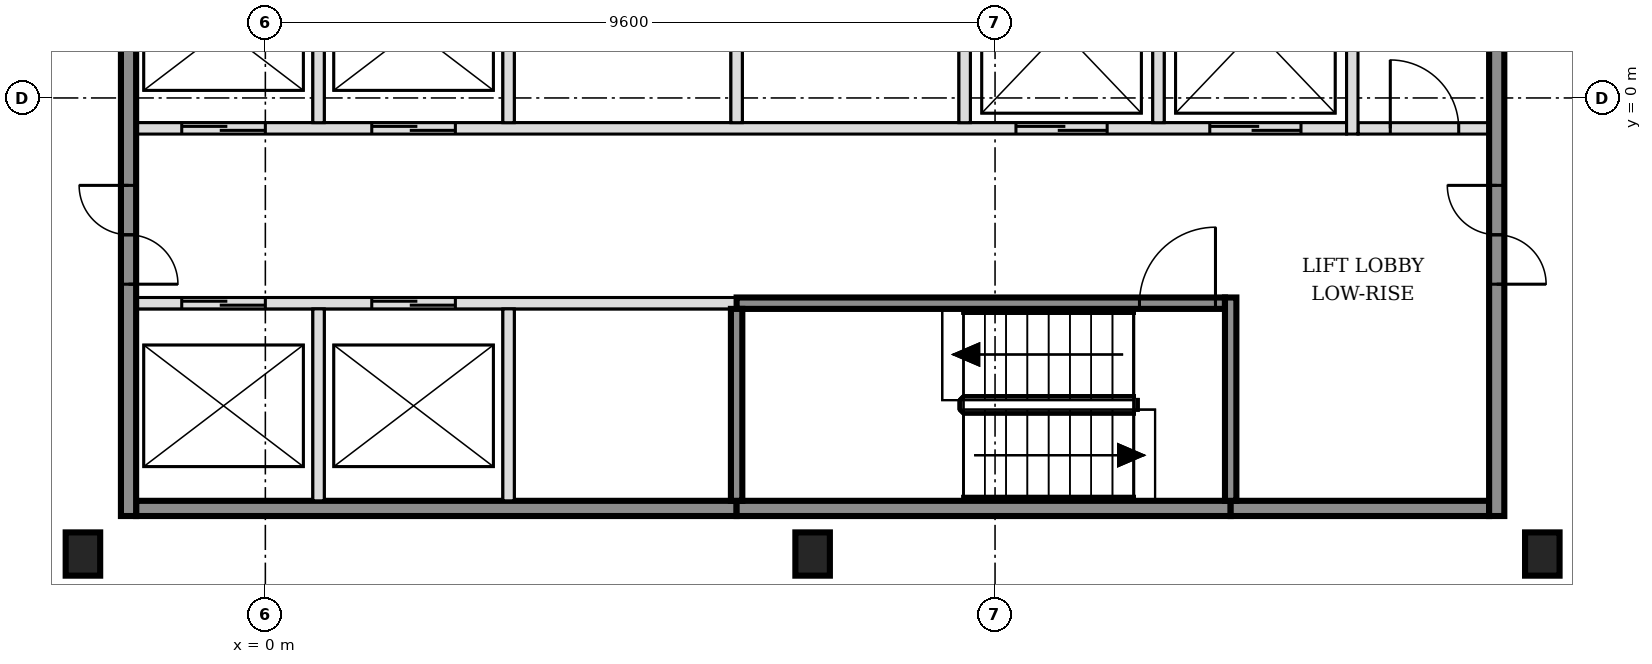
"""IFC4 building model, lengths in metres.
Left out: names, types, materials, properties, quantities, classifications, styles, units other than length and angle.
Written with IfcOpenShell. Run it as: python <this file> out.ifc"""

import sys

from ifc_helpers import new_model, si_unit, direction, frame, frame_2d, origin, origin_2d, place, context, subcontext, project, spatial, rectangle, i_section, extrude, element, fill, save


model = new_model("IFC4")
c1 = context("Model", 3, precision=1e-05, world=origin(), true_north=direction((0.0, 1.0)))
c2 = subcontext(c1, "Body", "Model", "MODEL_VIEW")
j1 = project(units=[si_unit("LENGTHUNIT", "METRE"), si_unit("PLANEANGLEUNIT", "RADIAN")], contexts=[c1])
p1 = place(None, origin())
s1 = spatial("IfcSite", under=j1, at=p1, CompositionType="ELEMENT")
p2 = place(p1, origin())
s2 = spatial("IfcBuilding", under=s1, at=p2, CompositionType="ELEMENT")
p3 = place(p2, frame((0.0, 0.0, 15.0)))
s3 = spatial("IfcBuildingStorey", under=s2, at=p3, CompositionType="ELEMENT", Elevation=15.0)
for number, where, z_axis, x_axis in (
    (1, (-2.4, -6.0, -0.2), (0.0, 0.0, 1.0), (1.0, 0.0, 0.0)),
    (2, (7.2, -6.0, -0.2), (0.0, 0.0, 1.0), (1.0, 0.0, 0.0)),
    (3, (16.8, -6.0, -0.2), (0.0, 0.0, 1.0), (1.0, 0.0, 0.0)),
):
    element("IfcColumn", number, at=place(p3, frame(where, z_axis=z_axis, x_axis=x_axis)), inside=s3, PredefinedType="COLUMN", context=c2, shape_type="SweptSolid", body=[
        extrude(i_section(OverallWidth=0.454, OverallDepth=0.569, WebThickness=0.078, FlangeThickness=0.125, FilletRadius=0.015, at=origin_2d()), origin(), (0.0, 0.0, 1.0), 6.0),
    ])
p4 = place(p3, frame((-1.7, -5.4, 0.0), z_axis=(0.0, 0.0, 1.0), x_axis=(1.0, 0.0, 0.0)))
e4 = element("IfcWall", 4, at=p4, inside=s3, PredefinedType="SOLIDWALL", context=c2, shape_type="SweptSolid", body=[
    extrude(rectangle(XDim=7.9, YDim=0.2, at=frame_2d((3.95, 0.0))), origin(), (0.0, 0.0, 1.0), 5.8),
])
p5 = place(p3, frame((6.2, -5.4, 0.0), z_axis=(0.0, 0.0, 1.0), x_axis=(1.0, 0.0, 0.0)))
e5 = element("IfcWall", 5, at=p5, inside=s3, PredefinedType="SOLIDWALL", context=c2, shape_type="SweptSolid", body=[
    extrude(rectangle(XDim=6.5, YDim=0.2, at=frame_2d((3.25, 0.0))), origin(), (0.0, 0.0, 1.0), 5.8),
])
p6 = place(p3, frame((12.7, -5.4, 0.0), z_axis=(0.0, 0.0, 1.0), x_axis=(1.0, 0.0, 0.0)))
e6 = element("IfcWall", 6, at=p6, inside=s3, PredefinedType="SOLIDWALL", context=c2, shape_type="SweptSolid", body=[
    extrude(rectangle(XDim=3.4, YDim=0.2, at=frame_2d((1.7, 0.0))), origin(), (0.0, 0.0, 1.0), 5.8),
])
p7 = place(p3, frame((-1.7, -2.7, 0.0), z_axis=(0.0, 0.0, 1.0), x_axis=(1.0, 0.0, 0.0)))
e7 = element("IfcWall", 7, at=p7, inside=s3, PredefinedType="SOLIDWALL", context=c2, shape_type="SweptSolid", body=[
    extrude(rectangle(XDim=7.9, YDim=0.15, at=frame_2d((3.95, 0.0))), origin(), (0.0, 0.0, 1.0), 5.8),
])
p8 = place(p7, frame((0.6, 0.0, 0.0)))
e8 = element("IfcOpeningElement", 8, at=p8, cuts=e7, PredefinedType="OPENING", context=c2, shape_type="SweptSolid", body=[
    extrude(rectangle(XDim=1.1, YDim=2.1, at=frame_2d((0.55, 1.05))), frame((0.0, 0.085, 0.0), z_axis=(0.0, -1.0, 0.0), x_axis=(1.0, 0.0, 0.0)), (0.0, 0.0, 1.0), 0.17),
])
p9 = place(p7, frame((3.1, 0.0, 0.0)))
e9 = element("IfcOpeningElement", 9, at=p9, cuts=e7, PredefinedType="OPENING", context=c2, shape_type="SweptSolid", body=[
    extrude(rectangle(XDim=1.1, YDim=2.1, at=frame_2d((0.55, 1.05))), frame((0.0, 0.085, 0.0), z_axis=(0.0, -1.0, 0.0), x_axis=(1.0, 0.0, 0.0)), (0.0, 0.0, 1.0), 0.17),
])
p10 = place(p3, frame((6.2, -2.7, 0.0), z_axis=(0.0, 0.0, 1.0), x_axis=(1.0, 0.0, 0.0)))
e10 = element("IfcWall", 10, at=p10, inside=s3, PredefinedType="SOLIDWALL", context=c2, shape_type="SweptSolid", body=[
    extrude(rectangle(XDim=6.425, YDim=0.15, at=frame_2d((3.212, 0.0))), origin(), (0.0, 0.0, 1.0), 5.8),
])
p11 = place(p10, frame((5.3, 0.0, 0.0)))
e11 = element("IfcOpeningElement", 11, at=p11, cuts=e10, PredefinedType="OPENING", context=c2, shape_type="SweptSolid", body=[
    extrude(rectangle(XDim=1.0, YDim=2.1, at=frame_2d((0.5, 1.05))), frame((0.0, 0.085, 0.0), z_axis=(0.0, -1.0, 0.0), x_axis=(1.0, 0.0, 0.0)), (0.0, 0.0, 1.0), 0.17),
])
p12 = place(p3, frame((-1.7, -0.4, 0.0), z_axis=(0.0, 0.0, 1.0), x_axis=(1.0, 0.0, 0.0)))
e12 = element("IfcWall", 12, at=p12, inside=s3, PredefinedType="SOLIDWALL", context=c2, shape_type="SweptSolid", body=[
    extrude(rectangle(XDim=15.925, YDim=0.15, at=frame_2d((7.962, 0.0))), origin(), (0.0, 0.0, 1.0), 5.8),
])
p13 = place(p12, frame((0.6, 0.0, 0.0)))
e13 = element("IfcOpeningElement", 13, at=p13, cuts=e12, PredefinedType="OPENING", context=c2, shape_type="SweptSolid", body=[
    extrude(rectangle(XDim=1.1, YDim=2.1, at=frame_2d((0.55, 1.05))), frame((0.0, 0.085, 0.0), z_axis=(0.0, -1.0, 0.0), x_axis=(1.0, 0.0, 0.0)), (0.0, 0.0, 1.0), 0.17),
])
p14 = place(p12, frame((3.1, 0.0, 0.0)))
e14 = element("IfcOpeningElement", 14, at=p14, cuts=e12, PredefinedType="OPENING", context=c2, shape_type="SweptSolid", body=[
    extrude(rectangle(XDim=1.1, YDim=2.1, at=frame_2d((0.55, 1.05))), frame((0.0, 0.085, 0.0), z_axis=(0.0, -1.0, 0.0), x_axis=(1.0, 0.0, 0.0)), (0.0, 0.0, 1.0), 0.17),
])
p15 = place(p12, frame((11.575, 0.0, 0.0)))
e15 = element("IfcOpeningElement", 15, at=p15, cuts=e12, PredefinedType="OPENING", context=c2, shape_type="SweptSolid", body=[
    extrude(rectangle(XDim=1.2, YDim=2.1, at=frame_2d((0.6, 1.05))), frame((0.0, 0.085, 0.0), z_axis=(0.0, -1.0, 0.0), x_axis=(1.0, 0.0, 0.0)), (0.0, 0.0, 1.0), 0.17),
])
p16 = place(p12, frame((14.125, 0.0, 0.0)))
e16 = element("IfcOpeningElement", 16, at=p16, cuts=e12, PredefinedType="OPENING", context=c2, shape_type="SweptSolid", body=[
    extrude(rectangle(XDim=1.2, YDim=2.1, at=frame_2d((0.6, 1.05))), frame((0.0, 0.085, 0.0), z_axis=(0.0, -1.0, 0.0), x_axis=(1.0, 0.0, 0.0)), (0.0, 0.0, 1.0), 0.17),
])
p17 = place(p3, frame((14.375, -0.4, 0.0), z_axis=(0.0, 0.0, 1.0), x_axis=(1.0, 0.0, 0.0)))
e17 = element("IfcWall", 17, at=p17, inside=s3, PredefinedType="PARTITIONING", context=c2, shape_type="SweptSolid", body=[
    extrude(rectangle(XDim=1.725, YDim=0.15, at=frame_2d((0.863, 0.0))), origin(), (0.0, 0.0, 1.0), 5.8),
])
p18 = place(p17, frame((0.425, 0.0, 0.0)))
e18 = element("IfcOpeningElement", 18, at=p18, cuts=e17, PredefinedType="OPENING", context=c2, shape_type="SweptSolid", body=[
    extrude(rectangle(XDim=0.9, YDim=2.1, at=frame_2d((0.45, 1.05))), frame((0.0, 0.085, 0.0), z_axis=(0.0, -1.0, 0.0), x_axis=(1.0, 0.0, 0.0)), (0.0, 0.0, 1.0), 0.17),
])
p19 = place(p3, frame((-1.8, -5.5, 0.0), z_axis=(0.0, 0.0, 1.0), x_axis=(0.0, 1.0, 0.0)))
e19 = element("IfcWall", 19, at=p19, inside=s3, PredefinedType="SOLIDWALL", context=c2, shape_type="SweptSolid", body=[
    extrude(rectangle(XDim=15.8, YDim=0.2, at=frame_2d((7.9, 0.0))), origin(), (0.0, 0.0, 1.0), 5.8),
])
p20 = place(p19, frame((3.05, 0.0, 0.0)))
e20 = element("IfcOpeningElement", 20, at=p20, cuts=e19, PredefinedType="OPENING", context=c2, shape_type="SweptSolid", body=[
    extrude(rectangle(XDim=1.3, YDim=2.1, at=frame_2d((0.65, 1.05))), frame((0.0, 0.11, 0.0), z_axis=(0.0, -1.0, 0.0), x_axis=(1.0, 0.0, 0.0)), (0.0, 0.0, 1.0), 0.22),
])
p21 = place(p19, frame((11.45, 0.0, 0.0)))
e21 = element("IfcOpeningElement", 21, at=p21, cuts=e19, PredefinedType="OPENING", context=c2, shape_type="SweptSolid", body=[
    extrude(rectangle(XDim=1.3, YDim=2.1, at=frame_2d((0.65, 1.05))), frame((0.0, 0.11, 0.0), z_axis=(0.0, -1.0, 0.0), x_axis=(1.0, 0.0, 0.0)), (0.0, 0.0, 1.0), 0.22),
])
p22 = place(p3, frame((0.7, -5.3, 0.0), z_axis=(0.0, 0.0, 1.0), x_axis=(0.0, 1.0, 0.0)))
e22 = element("IfcWall", 22, at=p22, inside=s3, PredefinedType="SOLIDWALL", context=c2, shape_type="SweptSolid", body=[
    extrude(rectangle(XDim=2.525, YDim=0.15, at=frame_2d((1.263, 0.0))), origin(), (0.0, 0.0, 1.0), 5.8),
])
p23 = place(p3, frame((0.7, -0.325, 0.0), z_axis=(0.0, 0.0, 1.0), x_axis=(0.0, 1.0, 0.0)))
e23 = element("IfcWall", 23, at=p23, inside=s3, PredefinedType="SOLIDWALL", context=c2, shape_type="SweptSolid", body=[
    extrude(rectangle(XDim=2.45, YDim=0.15, at=frame_2d((1.225, 0.0))), origin(), (0.0, 0.0, 1.0), 5.8),
])
p24 = place(p3, frame((3.2, -5.3, 0.0), z_axis=(0.0, 0.0, 1.0), x_axis=(0.0, 1.0, 0.0)))
e24 = element("IfcWall", 24, at=p24, inside=s3, PredefinedType="SOLIDWALL", context=c2, shape_type="SweptSolid", body=[
    extrude(rectangle(XDim=2.525, YDim=0.15, at=frame_2d((1.263, 0.0))), origin(), (0.0, 0.0, 1.0), 5.8),
])
p25 = place(p3, frame((3.2, -0.325, 0.0), z_axis=(0.0, 0.0, 1.0), x_axis=(0.0, 1.0, 0.0)))
e25 = element("IfcWall", 25, at=p25, inside=s3, PredefinedType="SOLIDWALL", context=c2, shape_type="SweptSolid", body=[
    extrude(rectangle(XDim=2.45, YDim=0.15, at=frame_2d((1.225, 0.0))), origin(), (0.0, 0.0, 1.0), 5.8),
])
p26 = place(p3, frame((6.2, -5.3, 0.0), z_axis=(0.0, 0.0, 1.0), x_axis=(0.0, 1.0, 0.0)))
e26 = element("IfcWall", 26, at=p26, inside=s3, PredefinedType="SOLIDWALL", context=c2, shape_type="SweptSolid", body=[
    extrude(rectangle(XDim=2.525, YDim=0.15, at=frame_2d((1.263, 0.0))), origin(), (0.0, 0.0, 1.0), 5.8),
])
for number, where, z_axis, x_axis in (
    (27, (6.2, -0.325, 0.0), (0.0, 0.0, 1.0), (0.0, 1.0, 0.0)),
    (28, (9.2, -0.325, 0.0), (0.0, 0.0, 1.0), (0.0, 1.0, 0.0)),
    (29, (11.75, -0.325, 0.0), (0.0, 0.0, 1.0), (0.0, 1.0, 0.0)),
):
    element("IfcWall", number, at=place(p3, frame(where, z_axis=z_axis, x_axis=x_axis)), inside=s3, PredefinedType="SOLIDWALL", context=c2, shape_type="SweptSolid", body=[
        extrude(rectangle(XDim=2.45, YDim=0.15, at=frame_2d((1.225, 0.0))), origin(), (0.0, 0.0, 1.0), 5.8),
    ])
p27 = place(p3, frame((12.7, -5.3, 0.0), z_axis=(0.0, 0.0, 1.0), x_axis=(0.0, 1.0, 0.0)))
e30 = element("IfcWall", 30, at=p27, inside=s3, PredefinedType="SOLIDWALL", context=c2, shape_type="SweptSolid", body=[
    extrude(rectangle(XDim=2.675, YDim=0.15, at=frame_2d((1.337, 0.0))), origin(), (0.0, 0.0, 1.0), 5.8),
])
p28 = place(p3, frame((14.3, -0.475, 0.0), z_axis=(0.0, 0.0, 1.0), x_axis=(0.0, 1.0, 0.0)))
e31 = element("IfcWall", 31, at=p28, inside=s3, PredefinedType="SOLIDWALL", context=c2, shape_type="SweptSolid", body=[
    extrude(rectangle(XDim=2.75, YDim=0.15, at=frame_2d((1.375, 0.0))), origin(), (0.0, 0.0, 1.0), 5.8),
])
p29 = place(p3, frame((16.2, -5.5, 0.0), z_axis=(0.0, 0.0, 1.0), x_axis=(0.0, 1.0, 0.0)))
e32 = element("IfcWall", 32, at=p29, inside=s3, PredefinedType="SOLIDWALL", context=c2, shape_type="SweptSolid", body=[
    extrude(rectangle(XDim=15.8, YDim=0.2, at=frame_2d((7.9, 0.0))), origin(), (0.0, 0.0, 1.0), 5.8),
])
p30 = place(p29, frame((3.05, 0.0, 0.0)))
e33 = element("IfcOpeningElement", 33, at=p30, cuts=e32, PredefinedType="OPENING", context=c2, shape_type="SweptSolid", body=[
    extrude(rectangle(XDim=1.3, YDim=2.1, at=frame_2d((0.65, 1.05))), frame((0.0, 0.11, 0.0), z_axis=(0.0, -1.0, 0.0), x_axis=(1.0, 0.0, 0.0)), (0.0, 0.0, 1.0), 0.22),
])
p31 = place(p29, frame((11.45, 0.0, 0.0)))
e34 = element("IfcOpeningElement", 34, at=p31, cuts=e32, PredefinedType="OPENING", context=c2, shape_type="SweptSolid", body=[
    extrude(rectangle(XDim=1.3, YDim=2.1, at=frame_2d((0.65, 1.05))), frame((0.0, 0.11, 0.0), z_axis=(0.0, -1.0, 0.0), x_axis=(1.0, 0.0, 0.0)), (0.0, 0.0, 1.0), 0.22),
])
p32 = place(p8, origin())
e35 = element("IfcDoor", 35, at=p32, inside=s3, OperationType="DOUBLE_DOOR_SLIDING", PredefinedType="DOOR", context=c2, shape_type="SweptSolid", body=[
    extrude(rectangle(XDim=1.1, YDim=2.1, at=frame_2d((0.55, 1.05))), frame((0.0, 0.025, 0.0), z_axis=(0.0, -1.0, 0.0), x_axis=(1.0, 0.0, 0.0)), (0.0, 0.0, 1.0), 0.05),
])
fill(e8, e35)
p33 = place(p9, origin())
e36 = element("IfcDoor", 36, at=p33, inside=s3, OperationType="DOUBLE_DOOR_SLIDING", PredefinedType="DOOR", context=c2, shape_type="SweptSolid", body=[
    extrude(rectangle(XDim=1.1, YDim=2.1, at=frame_2d((0.55, 1.05))), frame((0.0, 0.025, 0.0), z_axis=(0.0, -1.0, 0.0), x_axis=(1.0, 0.0, 0.0)), (0.0, 0.0, 1.0), 0.05),
])
fill(e9, e36)
p34 = place(p13, origin())
e37 = element("IfcDoor", 37, at=p34, inside=s3, OperationType="DOUBLE_DOOR_SLIDING", PredefinedType="DOOR", context=c2, shape_type="SweptSolid", body=[
    extrude(rectangle(XDim=1.1, YDim=2.1, at=frame_2d((0.55, 1.05))), frame((0.0, 0.025, 0.0), z_axis=(0.0, -1.0, 0.0), x_axis=(1.0, 0.0, 0.0)), (0.0, 0.0, 1.0), 0.05),
])
fill(e13, e37)
p35 = place(p14, origin())
e38 = element("IfcDoor", 38, at=p35, inside=s3, OperationType="DOUBLE_DOOR_SLIDING", PredefinedType="DOOR", context=c2, shape_type="SweptSolid", body=[
    extrude(rectangle(XDim=1.1, YDim=2.1, at=frame_2d((0.55, 1.05))), frame((0.0, 0.025, 0.0), z_axis=(0.0, -1.0, 0.0), x_axis=(1.0, 0.0, 0.0)), (0.0, 0.0, 1.0), 0.05),
])
fill(e14, e38)
p36 = place(p15, origin())
e39 = element("IfcDoor", 39, at=p36, inside=s3, OperationType="DOUBLE_DOOR_SLIDING", PredefinedType="DOOR", context=c2, shape_type="SweptSolid", body=[
    extrude(rectangle(XDim=1.2, YDim=2.1, at=frame_2d((0.6, 1.05))), frame((0.0, 0.025, 0.0), z_axis=(0.0, -1.0, 0.0), x_axis=(1.0, 0.0, 0.0)), (0.0, 0.0, 1.0), 0.05),
])
fill(e15, e39)
p37 = place(p16, origin())
e40 = element("IfcDoor", 40, at=p37, inside=s3, OperationType="DOUBLE_DOOR_SLIDING", PredefinedType="DOOR", context=c2, shape_type="SweptSolid", body=[
    extrude(rectangle(XDim=1.2, YDim=2.1, at=frame_2d((0.6, 1.05))), frame((0.0, 0.025, 0.0), z_axis=(0.0, -1.0, 0.0), x_axis=(1.0, 0.0, 0.0)), (0.0, 0.0, 1.0), 0.05),
])
fill(e16, e40)
p38 = place(p11, origin())
e41 = element("IfcDoor", 41, at=p38, inside=s3, OperationType="SINGLE_SWING_RIGHT", PredefinedType="DOOR", context=c2, shape_type="SweptSolid", body=[
    extrude(rectangle(XDim=1.0, YDim=2.1, at=frame_2d((0.5, 1.05))), frame((0.0, 0.025, 0.0), z_axis=(0.0, -1.0, 0.0), x_axis=(1.0, 0.0, 0.0)), (0.0, 0.0, 1.0), 0.05),
])
fill(e11, e41)
p39 = place(p20, origin())
e42 = element("IfcDoor", 42, at=p39, inside=s3, OperationType="DOUBLE_DOOR_SINGLE_SWING", PredefinedType="DOOR", context=c2, shape_type="SweptSolid", body=[
    extrude(rectangle(XDim=1.3, YDim=2.1, at=frame_2d((0.65, 1.05))), frame((0.0, 0.025, 0.0), z_axis=(0.0, -1.0, 0.0), x_axis=(1.0, 0.0, 0.0)), (0.0, 0.0, 1.0), 0.05),
])
fill(e20, e42)
p40 = place(p30, origin())
e43 = element("IfcDoor", 43, at=p40, inside=s3, OperationType="DOUBLE_DOOR_SINGLE_SWING", PredefinedType="DOOR", context=c2, shape_type="SweptSolid", body=[
    extrude(rectangle(XDim=1.3, YDim=2.1, at=frame_2d((0.65, 1.05))), frame((0.0, 0.025, 0.0), z_axis=(0.0, -1.0, 0.0), x_axis=(1.0, 0.0, 0.0)), (0.0, 0.0, 1.0), 0.05),
])
fill(e33, e43)
p41 = place(p18, origin())
e44 = element("IfcDoor", 44, at=p41, inside=s3, OperationType="SINGLE_SWING_LEFT", PredefinedType="DOOR", context=c2, shape_type="SweptSolid", body=[
    extrude(rectangle(XDim=0.9, YDim=2.1, at=frame_2d((0.45, 1.05))), frame((0.0, 0.025, 0.0), z_axis=(0.0, -1.0, 0.0), x_axis=(1.0, 0.0, 0.0)), (0.0, 0.0, 1.0), 0.05),
])
fill(e18, e44)
save(model, sys.argv[1])
